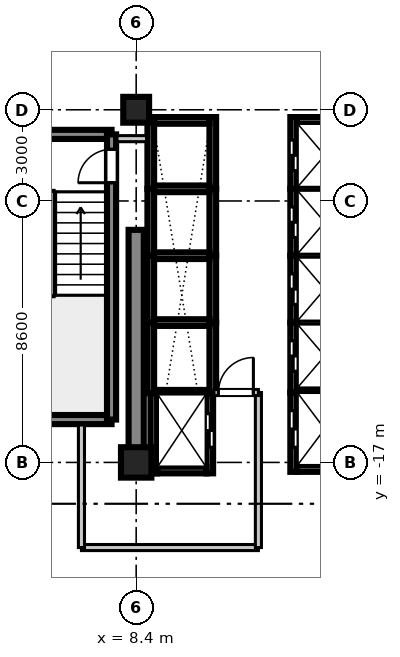
"""IFC4 building model, lengths in metres.
Left out: names, types, materials, properties, quantities, classifications, styles, units other than length and angle.
Written with IfcOpenShell. Run it as: python <this file> out.ifc"""

import sys

from ifc_helpers import new_model, si_unit, direction, frame, frame_2d, origin, origin_2d, place, context, subcontext, project, spatial, rectangle, extrude, source, transform, mapped, element, fill, save


model = new_model("IFC4")
c1 = context("Model", 3, precision=1e-05, world=origin(), true_north=direction((0.0, 1.0)))
c2 = subcontext(c1, "Body", "Model", "MODEL_VIEW")
j1 = project(units=[si_unit("LENGTHUNIT", "METRE"), si_unit("PLANEANGLEUNIT", "RADIAN")], contexts=[c1])
p1 = place(None, origin())
s1 = spatial("IfcSite", under=j1, at=p1, CompositionType="ELEMENT")
p2 = place(p1, origin())
s2 = spatial("IfcBuilding", under=s1, at=p2, CompositionType="ELEMENT")
p3 = place(p2, frame((0.0, 0.0, 249.3)))
s3 = spatial("IfcBuildingStorey", under=s2, at=p3, CompositionType="ELEMENT", Elevation=249.3)
m1 = source(origin(), c2, "Body", "SweptSolid", [
    extrude(rectangle(XDim=1.0, YDim=1.0, at=origin_2d()), origin(), (0.0, 0.0, 1.0), 3.655),
])
p4 = place(p3, frame((8.4, -17.0, 0.0), z_axis=(0.0, 0.0, 1.0), x_axis=(1.0, 0.0, 0.0)))
e1 = element("IfcColumn", 1, at=p4, inside=s3, PredefinedType="COLUMN", context=c2, shape_type="MappedRepresentation", body=[
    mapped(m1, transform((0.0, 0.0, 0.0), scale=1.0)),
])
m2 = source(origin(), c2, "Body", "SweptSolid", [
    extrude(rectangle(XDim=0.85, YDim=0.85, at=origin_2d()), origin(), (0.0, 0.0, 1.0), 3.655),
])
p5 = place(p3, frame((8.4, -5.4, 0.0), z_axis=(0.0, 0.0, 1.0), x_axis=(1.0, 0.0, 0.0)))
e2 = element("IfcColumn", 2, at=p5, inside=s3, PredefinedType="PILASTER", context=c2, shape_type="MappedRepresentation", body=[
    mapped(m2, transform((0.0, 0.0, 0.0), scale=1.0)),
])
m3 = source(origin(), c2, "Body", "SweptSolid", [
    extrude(rectangle(XDim=7.65, YDim=0.5, at=frame_2d((3.825, 0.0))), origin(), (0.0, 0.0, 1.0), 3.41),
])
p6 = place(p3, frame((8.4, -17.0, 0.0), z_axis=(0.0, 0.0, 1.0), x_axis=(0.0, 1.0, 0.0)))
e3 = element("IfcWall", 3, at=p6, inside=s3, PredefinedType="SHEAR", context=c2, shape_type="MappedRepresentation", body=[
    mapped(m3, transform((0.0, 0.0, 0.0), scale=1.0)),
])
m4 = source(origin(), c2, "Body", "SweptSolid", [
    extrude(rectangle(XDim=3.98, YDim=0.3, at=frame_2d((1.99, 0.0))), origin(), (0.0, 0.0, 1.0), 3.41),
])
for number, where, z_axis, x_axis in (
    (4, (3.61, -15.59, 0.0), (0.0, 0.0, 1.0), (1.0, 0.0, 0.0)),
    (5, (3.61, -6.21, 0.0), (0.0, 0.0, 1.0), (1.0, 0.0, 0.0)),
):
    element("IfcWall", number, at=place(p3, frame(where, z_axis=z_axis, x_axis=x_axis)), inside=s3, PredefinedType="SHEAR", context=c2, shape_type="MappedRepresentation", body=[
        mapped(m4, transform((0.0, 0.0, 0.0), scale=1.0)),
    ])
m5 = source(origin(), c2, "Body", "SweptSolid", [
    extrude(rectangle(XDim=9.38, YDim=0.3, at=frame_2d((4.69, 0.0))), origin(), (0.0, 0.0, 1.0), 3.41),
])
p7 = place(p3, frame((7.59, -15.59, 0.0), z_axis=(0.0, 0.0, 1.0), x_axis=(0.0, 1.0, 0.0)))
e6 = element("IfcWall", 6, at=p7, inside=s3, PredefinedType="SHEAR", context=c2, shape_type="MappedRepresentation", body=[
    mapped(m5, transform((0.0, 0.0, 0.0), scale=1.0)),
])
p8 = place(p7, frame((7.79, 0.0, 0.0)))
e7 = element("IfcOpeningElement", 7, at=p8, cuts=e6, PredefinedType="OPENING", context=c2, shape_type="SweptSolid", body=[
    extrude(rectangle(XDim=1.1, YDim=2.15, at=frame_2d((0.55, 1.075))), frame((0.0, 0.16, 0.0), z_axis=(0.0, -1.0, 0.0), x_axis=(1.0, 0.0, 0.0)), (0.0, 0.0, 1.0), 0.32),
])
m6 = source(origin(), c2, "Body", "SweptSolid", [
    extrude(rectangle(XDim=2.36, YDim=0.22, at=frame_2d((1.18, 0.0))), origin(), (0.0, 0.0, 1.0), 3.41),
])
p9 = place(p3, frame((13.58, -8.0, 0.0), z_axis=(0.0, 0.0, 1.0), x_axis=(0.0, 1.0, 0.0)))
e8 = element("IfcWall", 8, at=p9, inside=s3, PredefinedType="SHEAR", context=c2, shape_type="MappedRepresentation", body=[
    mapped(m6, transform((0.0, 0.0, 0.0), scale=1.0)),
])
p10 = place(p9, frame((0.6, 0.0, 0.0)))
e9 = element("IfcOpeningElement", 9, at=p10, cuts=e8, PredefinedType="OPENING", context=c2, shape_type="SweptSolid", body=[
    extrude(rectangle(XDim=1.0, YDim=2.2, at=frame_2d((0.5, 1.1))), frame((0.0, 0.12, 0.0), z_axis=(0.0, -1.0, 0.0), x_axis=(1.0, 0.0, 0.0)), (0.0, 0.0, 1.0), 0.24),
])
m7 = source(origin(), c2, "Body", "SweptSolid", [
    extrude(rectangle(XDim=1.82, YDim=0.22, at=frame_2d((0.91, 0.0))), origin(), (0.0, 0.0, 1.0), 3.41),
])
p11 = place(p3, frame((13.69, -5.75, 0.0), z_axis=(0.0, 0.0, 1.0), x_axis=(1.0, 0.0, 0.0)))
e10 = element("IfcWall", 10, at=p11, inside=s3, PredefinedType="SHEAR", context=c2, shape_type="MappedRepresentation", body=[
    mapped(m7, transform((0.0, 0.0, 0.0), scale=1.0)),
])
m8 = source(origin(), c2, "Body", "SweptSolid", [
    extrude(rectangle(XDim=2.2, YDim=0.22, at=frame_2d((1.1, 0.0))), origin(), (0.0, 0.0, 1.0), 3.41),
])
p12 = place(p3, frame((13.58, -10.2, 0.0), z_axis=(0.0, 0.0, 1.0), x_axis=(0.0, 1.0, 0.0)))
e11 = element("IfcWall", 11, at=p12, inside=s3, PredefinedType="SHEAR", context=c2, shape_type="MappedRepresentation", body=[
    mapped(m8, transform((0.0, 0.0, 0.0), scale=1.0)),
])
p13 = place(p12, frame((0.6, 0.0, 0.0)))
e12 = element("IfcOpeningElement", 12, at=p13, cuts=e11, PredefinedType="OPENING", context=c2, shape_type="SweptSolid", body=[
    extrude(rectangle(XDim=1.0, YDim=2.2, at=frame_2d((0.5, 1.1))), frame((0.0, 0.12, 0.0), z_axis=(0.0, -1.0, 0.0), x_axis=(1.0, 0.0, 0.0)), (0.0, 0.0, 1.0), 0.24),
])
m9 = source(origin(), c2, "Body", "SweptSolid", [
    extrude(rectangle(XDim=1.82, YDim=0.22, at=frame_2d((0.91, 0.0))), origin(), (0.0, 0.0, 1.0), 3.7),
])
p14 = place(p3, frame((13.69, -8.0, 0.0), z_axis=(0.0, 0.0, 1.0), x_axis=(1.0, 0.0, 0.0)))
e13 = element("IfcWall", 13, at=p14, inside=s3, PredefinedType="SHEAR", context=c2, shape_type="MappedRepresentation", body=[
    mapped(m9, transform((0.0, 0.0, 0.0), scale=1.0)),
])
p15 = place(p3, frame((13.58, -12.4, 0.0), z_axis=(0.0, 0.0, 1.0), x_axis=(0.0, 1.0, 0.0)))
e14 = element("IfcWall", 14, at=p15, inside=s3, PredefinedType="SHEAR", context=c2, shape_type="MappedRepresentation", body=[
    mapped(m8, transform((0.0, 0.0, 0.0), scale=1.0)),
])
p16 = place(p15, frame((0.6, 0.0, 0.0)))
e15 = element("IfcOpeningElement", 15, at=p16, cuts=e14, PredefinedType="OPENING", context=c2, shape_type="SweptSolid", body=[
    extrude(rectangle(XDim=1.0, YDim=2.2, at=frame_2d((0.5, 1.1))), frame((0.0, 0.12, 0.0), z_axis=(0.0, -1.0, 0.0), x_axis=(1.0, 0.0, 0.0)), (0.0, 0.0, 1.0), 0.24),
])
p17 = place(p3, frame((13.69, -10.2, 0.0), z_axis=(0.0, 0.0, 1.0), x_axis=(1.0, 0.0, 0.0)))
e16 = element("IfcWall", 16, at=p17, inside=s3, PredefinedType="SHEAR", context=c2, shape_type="MappedRepresentation", body=[
    mapped(m9, transform((0.0, 0.0, 0.0), scale=1.0)),
])
m10 = source(origin(), c2, "Body", "SweptSolid", [
    extrude(rectangle(XDim=2.3, YDim=0.22, at=frame_2d((1.15, 0.0))), origin(), (0.0, 0.0, 1.0), 3.41),
])
p18 = place(p3, frame((13.58, -14.7, 0.0), z_axis=(0.0, 0.0, 1.0), x_axis=(0.0, 1.0, 0.0)))
e17 = element("IfcWall", 17, at=p18, inside=s3, PredefinedType="SHEAR", context=c2, shape_type="MappedRepresentation", body=[
    mapped(m10, transform((0.0, 0.0, 0.0), scale=1.0)),
])
p19 = place(p18, frame((0.7, 0.0, 0.0)))
e18 = element("IfcOpeningElement", 18, at=p19, cuts=e17, PredefinedType="OPENING", context=c2, shape_type="SweptSolid", body=[
    extrude(rectangle(XDim=1.0, YDim=2.2, at=frame_2d((0.5, 1.1))), frame((0.0, 0.12, 0.0), z_axis=(0.0, -1.0, 0.0), x_axis=(1.0, 0.0, 0.0)), (0.0, 0.0, 1.0), 0.24),
])
p20 = place(p3, frame((13.69, -12.4, 0.0), z_axis=(0.0, 0.0, 1.0), x_axis=(1.0, 0.0, 0.0)))
e19 = element("IfcWall", 19, at=p20, inside=s3, PredefinedType="SHEAR", context=c2, shape_type="MappedRepresentation", body=[
    mapped(m9, transform((0.0, 0.0, 0.0), scale=1.0)),
])
for number, where, z_axis, x_axis in (
    (20, (8.88, -8.0, 0.0), (0.0, 0.0, 1.0), (0.0, 1.0, 0.0)),
    (21, (10.92, -8.0, 0.0), (0.0, 0.0, 1.0), (0.0, 1.0, 0.0)),
):
    element("IfcWall", number, at=place(p3, frame(where, z_axis=z_axis, x_axis=x_axis)), inside=s3, PredefinedType="SHEAR", context=c2, shape_type="MappedRepresentation", body=[
        mapped(m6, transform((0.0, 0.0, 0.0), scale=1.0)),
    ])
p21 = place(p3, frame((8.99, -5.75, 0.0), z_axis=(0.0, 0.0, 1.0), x_axis=(1.0, 0.0, 0.0)))
e22 = element("IfcWall", 22, at=p21, inside=s3, PredefinedType="SHEAR", context=c2, shape_type="MappedRepresentation", body=[
    mapped(m7, transform((0.0, 0.0, 0.0), scale=1.0)),
])
for number, where, z_axis, x_axis in (
    (23, (8.88, -10.2, 0.0), (0.0, 0.0, 1.0), (0.0, 1.0, 0.0)),
    (24, (10.92, -10.2, 0.0), (0.0, 0.0, 1.0), (0.0, 1.0, 0.0)),
):
    element("IfcWall", number, at=place(p3, frame(where, z_axis=z_axis, x_axis=x_axis)), inside=s3, PredefinedType="SHEAR", context=c2, shape_type="MappedRepresentation", body=[
        mapped(m8, transform((0.0, 0.0, 0.0), scale=1.0)),
    ])
p22 = place(p3, frame((8.99, -8.0, 0.0), z_axis=(0.0, 0.0, 1.0), x_axis=(1.0, 0.0, 0.0)))
e25 = element("IfcWall", 25, at=p22, inside=s3, PredefinedType="SHEAR", context=c2, shape_type="MappedRepresentation", body=[
    mapped(m9, transform((0.0, 0.0, 0.0), scale=1.0)),
])
for number, where, z_axis, x_axis in (
    (26, (8.88, -12.4, 0.0), (0.0, 0.0, 1.0), (0.0, 1.0, 0.0)),
    (27, (10.92, -12.4, 0.0), (0.0, 0.0, 1.0), (0.0, 1.0, 0.0)),
):
    element("IfcWall", number, at=place(p3, frame(where, z_axis=z_axis, x_axis=x_axis)), inside=s3, PredefinedType="SHEAR", context=c2, shape_type="MappedRepresentation", body=[
        mapped(m8, transform((0.0, 0.0, 0.0), scale=1.0)),
    ])
p23 = place(p3, frame((8.99, -10.2, 0.0), z_axis=(0.0, 0.0, 1.0), x_axis=(1.0, 0.0, 0.0)))
e28 = element("IfcWall", 28, at=p23, inside=s3, PredefinedType="SHEAR", context=c2, shape_type="MappedRepresentation", body=[
    mapped(m9, transform((0.0, 0.0, 0.0), scale=1.0)),
])
m11 = source(origin(), c2, "Body", "SweptSolid", [
    extrude(rectangle(XDim=2.325, YDim=0.22, at=frame_2d((1.163, 0.0))), origin(), (0.0, 0.0, 1.0), 3.41),
])
for number, where, z_axis, x_axis in (
    (29, (8.88, -14.725, 0.0), (0.0, 0.0, 1.0), (0.0, 1.0, 0.0)),
    (30, (10.92, -14.725, 0.0), (0.0, 0.0, 1.0), (0.0, 1.0, 0.0)),
):
    element("IfcWall", number, at=place(p3, frame(where, z_axis=z_axis, x_axis=x_axis)), inside=s3, PredefinedType="SHEAR", context=c2, shape_type="MappedRepresentation", body=[
        mapped(m11, transform((0.0, 0.0, 0.0), scale=1.0)),
    ])
p24 = place(p3, frame((8.99, -12.4, 0.0), z_axis=(0.0, 0.0, 1.0), x_axis=(1.0, 0.0, 0.0)))
e31 = element("IfcWall", 31, at=p24, inside=s3, PredefinedType="SHEAR", context=c2, shape_type="MappedRepresentation", body=[
    mapped(m9, transform((0.0, 0.0, 0.0), scale=1.0)),
])
m12 = source(origin(), c2, "Body", "SweptSolid", [
    extrude(rectangle(XDim=2.635, YDim=0.22, at=frame_2d((1.317, 0.0))), origin(), (0.0, 0.0, 1.0), 3.41),
])
p25 = place(p3, frame((8.98, -17.36, 0.0), z_axis=(0.0, 0.0, 1.0), x_axis=(0.0, 1.0, 0.0)))
e32 = element("IfcWall", 32, at=p25, inside=s3, PredefinedType="SHEAR", context=c2, shape_type="MappedRepresentation", body=[
    mapped(m12, transform((0.0, 0.0, 0.0), scale=1.0)),
])
p26 = place(p3, frame((10.82, -17.36, 0.0), z_axis=(0.0, 0.0, 1.0), x_axis=(0.0, 1.0, 0.0)))
e33 = element("IfcWall", 33, at=p26, inside=s3, PredefinedType="SHEAR", context=c2, shape_type="MappedRepresentation", body=[
    mapped(m12, transform((0.0, 0.0, 0.0), scale=1.0)),
])
p27 = place(p26, frame((0.86, 0.0, 0.0)))
e34 = element("IfcOpeningElement", 34, at=p27, cuts=e33, PredefinedType="OPENING", context=c2, shape_type="SweptSolid", body=[
    extrude(rectangle(XDim=1.1, YDim=2.2, at=frame_2d((0.55, 1.1))), frame((0.0, 0.12, 0.0), z_axis=(0.0, -1.0, 0.0), x_axis=(1.0, 0.0, 0.0)), (0.0, 0.0, 1.0), 0.24),
])
m13 = source(origin(), c2, "Body", "SweptSolid", [
    extrude(rectangle(XDim=1.62, YDim=0.22, at=frame_2d((0.81, 0.0))), origin(), (0.0, 0.0, 1.0), 3.41),
])
p28 = place(p3, frame((9.09, -17.25, 0.0), z_axis=(0.0, 0.0, 1.0), x_axis=(1.0, 0.0, 0.0)))
e35 = element("IfcWall", 35, at=p28, inside=s3, PredefinedType="SHEAR", context=c2, shape_type="MappedRepresentation", body=[
    mapped(m13, transform((0.0, 0.0, 0.0), scale=1.0)),
])
m14 = source(origin(), c2, "Body", "SweptSolid", [
    extrude(rectangle(XDim=1.62, YDim=0.22, at=frame_2d((0.81, 0.0))), origin(), (0.0, 0.0, 1.0), 3.7),
])
p29 = place(p3, frame((9.09, -14.725, 0.0), z_axis=(0.0, 0.0, 1.0), x_axis=(1.0, 0.0, 0.0)))
e36 = element("IfcWall", 36, at=p29, inside=s3, PredefinedType="SHEAR", context=c2, shape_type="MappedRepresentation", body=[
    mapped(m14, transform((0.0, 0.0, 0.0), scale=1.0)),
])
m15 = source(origin(), c2, "Body", "SweptSolid", [
    extrude(rectangle(XDim=2.61, YDim=0.22, at=frame_2d((1.305, 0.0))), origin(), (0.0, 0.0, 1.0), 3.41),
])
p30 = place(p3, frame((13.58, -17.31, 0.0), z_axis=(0.0, 0.0, 1.0), x_axis=(0.0, 1.0, 0.0)))
e37 = element("IfcWall", 37, at=p30, inside=s3, PredefinedType="SHEAR", context=c2, shape_type="MappedRepresentation", body=[
    mapped(m15, transform((0.0, 0.0, 0.0), scale=1.0)),
])
p31 = place(p30, frame((0.81, 0.0, 0.0)))
e38 = element("IfcOpeningElement", 38, at=p31, cuts=e37, PredefinedType="OPENING", context=c2, shape_type="SweptSolid", body=[
    extrude(rectangle(XDim=1.2, YDim=2.2, at=frame_2d((0.6, 1.1))), frame((0.0, 0.12, 0.0), z_axis=(0.0, -1.0, 0.0), x_axis=(1.0, 0.0, 0.0)), (0.0, 0.0, 1.0), 0.24),
])
p32 = place(p3, frame((13.69, -17.2, 0.0), z_axis=(0.0, 0.0, 1.0), x_axis=(1.0, 0.0, 0.0)))
e39 = element("IfcWall", 39, at=p32, inside=s3, PredefinedType="SHEAR", context=c2, shape_type="MappedRepresentation", body=[
    mapped(m7, transform((0.0, 0.0, 0.0), scale=1.0)),
])
p33 = place(p3, frame((13.69, -14.7, 0.0), z_axis=(0.0, 0.0, 1.0), x_axis=(1.0, 0.0, 0.0)))
e40 = element("IfcWall", 40, at=p33, inside=s3, PredefinedType="SHEAR", context=c2, shape_type="MappedRepresentation", body=[
    mapped(m9, transform((0.0, 0.0, 0.0), scale=1.0)),
])
m16 = source(origin(), c2, "Body", "SweptSolid", [
    extrude(rectangle(XDim=5.82, YDim=0.2, at=frame_2d((2.91, 0.0))), origin(), (0.0, 0.0, 1.0), 2.75),
])
p34 = place(p3, frame((6.6, -19.8, 0.0), z_axis=(0.0, 0.0, 1.0), x_axis=(1.0, 0.0, 0.0)))
e41 = element("IfcWall", 41, at=p34, inside=s3, PredefinedType="PARTITIONING", context=c2, shape_type="MappedRepresentation", body=[
    mapped(m16, transform((0.0, 0.0, 0.0), scale=1.0)),
])
m17 = source(origin(), c2, "Body", "SweptSolid", [
    extrude(rectangle(XDim=4.03, YDim=0.2, at=frame_2d((2.015, 0.0))), origin(), (0.0, 0.0, 1.0), 2.75),
])
p35 = place(p3, frame((6.6, -19.8, 0.0), z_axis=(0.0, 0.0, 1.0), x_axis=(0.0, 1.0, 0.0)))
e42 = element("IfcWall", 42, at=p35, inside=s3, PredefinedType="PARTITIONING", context=c2, shape_type="MappedRepresentation", body=[
    mapped(m17, transform((0.0, 0.0, 0.0), scale=1.0)),
])
m18 = source(origin(), c2, "Body", "SweptSolid", [
    extrude(rectangle(XDim=5.1, YDim=0.2, at=frame_2d((2.55, 0.0))), origin(), (0.0, 0.0, 1.0), 2.75),
])
p36 = place(p3, frame((12.42, -19.8, 0.0), z_axis=(0.0, 0.0, 1.0), x_axis=(0.0, 1.0, 0.0)))
e43 = element("IfcWall", 43, at=p36, inside=s3, PredefinedType="PARTITIONING", context=c2, shape_type="MappedRepresentation", body=[
    mapped(m18, transform((0.0, 0.0, 0.0), scale=1.0)),
])
m19 = source(origin(), c2, "Body", "SweptSolid", [
    extrude(rectangle(XDim=1.46, YDim=0.2, at=frame_2d((0.73, 0.0))), origin(), (0.0, 0.0, 1.0), 2.75),
])
p37 = place(p3, frame((10.96, -14.7, 0.0), z_axis=(0.0, 0.0, 1.0), x_axis=(1.0, 0.0, 0.0)))
e44 = element("IfcWall", 44, at=p37, inside=s3, PredefinedType="PARTITIONING", context=c2, shape_type="MappedRepresentation", body=[
    mapped(m19, transform((0.0, 0.0, 0.0), scale=1.0)),
])
p38 = place(p37, frame((0.145, 0.0, 0.0)))
e45 = element("IfcOpeningElement", 45, at=p38, cuts=e44, PredefinedType="OPENING", context=c2, shape_type="SweptSolid", body=[
    extrude(rectangle(XDim=1.15, YDim=2.15, at=frame_2d((0.575, 1.075))), frame((0.0, 0.11, 0.0), z_axis=(0.0, -1.0, 0.0), x_axis=(1.0, 0.0, 0.0)), (0.0, 0.0, 1.0), 0.22),
])
m20 = source(origin(), c2, "Body", "SweptSolid", [
    extrude(rectangle(XDim=0.97, YDim=0.2, at=frame_2d((0.485, 0.0))), origin(), (0.0, 0.0, 1.0), 2.75),
])
p39 = place(p3, frame((7.77, -6.35, 0.0), z_axis=(0.0, 0.0, 1.0), x_axis=(1.0, 0.0, 0.0)))
e46 = element("IfcWall", 46, at=p39, inside=s3, PredefinedType="PARTITIONING", context=c2, shape_type="MappedRepresentation", body=[
    mapped(m20, transform((0.0, 0.0, 0.0), scale=1.0)),
])
m21 = source(origin(), c2, "Body", "SweptSolid", [
    extrude(rectangle(XDim=1.1, YDim=2.15, at=frame_2d((0.55, 1.075))), frame((0.0, 0.025, 0.0), z_axis=(0.0, -1.0, 0.0), x_axis=(1.0, 0.0, 0.0)), (0.0, 0.0, 1.0), 0.05),
])
p40 = place(p8, origin())
e47 = element("IfcDoor", 47, at=p40, inside=s3, OperationType="SINGLE_SWING_LEFT", PredefinedType="DOOR", context=c2, shape_type="MappedRepresentation", body=[
    mapped(m21, transform((0.0, 0.0, 0.0), scale=1.0)),
])
fill(e7, e47)
m22 = source(origin(), c2, "Body", "SweptSolid", [
    extrude(rectangle(XDim=1.0, YDim=2.2, at=frame_2d((0.5, 1.1))), frame((0.0, 0.025, 0.0), z_axis=(0.0, -1.0, 0.0), x_axis=(1.0, 0.0, 0.0)), (0.0, 0.0, 1.0), 0.05),
])
p41 = place(p10, origin())
e48 = element("IfcDoor", 48, at=p41, inside=s3, OperationType="DOUBLE_DOOR_SLIDING", PredefinedType="DOOR", context=c2, shape_type="MappedRepresentation", body=[
    mapped(m22, transform((0.0, 0.0, 0.0), scale=1.0)),
])
fill(e9, e48)
p42 = place(p13, origin())
e49 = element("IfcDoor", 49, at=p42, inside=s3, OperationType="DOUBLE_DOOR_SLIDING", PredefinedType="DOOR", context=c2, shape_type="MappedRepresentation", body=[
    mapped(m22, transform((0.0, 0.0, 0.0), scale=1.0)),
])
fill(e12, e49)
p43 = place(p16, origin())
e50 = element("IfcDoor", 50, at=p43, inside=s3, OperationType="DOUBLE_DOOR_SLIDING", PredefinedType="DOOR", context=c2, shape_type="MappedRepresentation", body=[
    mapped(m22, transform((0.0, 0.0, 0.0), scale=1.0)),
])
fill(e15, e50)
p44 = place(p19, origin())
e51 = element("IfcDoor", 51, at=p44, inside=s3, OperationType="DOUBLE_DOOR_SLIDING", PredefinedType="DOOR", context=c2, shape_type="MappedRepresentation", body=[
    mapped(m22, transform((0.0, 0.0, 0.0), scale=1.0)),
])
fill(e18, e51)
m23 = source(origin(), c2, "Body", "SweptSolid", [
    extrude(rectangle(XDim=1.1, YDim=2.2, at=frame_2d((0.55, 1.1))), frame((0.0, 0.025, 0.0), z_axis=(0.0, -1.0, 0.0), x_axis=(1.0, 0.0, 0.0)), (0.0, 0.0, 1.0), 0.05),
])
p45 = place(p27, frame((1.1, 0.0, 0.0), z_axis=(0.0, 0.0, 1.0), x_axis=(-1.0, 0.0, 0.0)))
e52 = element("IfcDoor", 52, at=p45, inside=s3, OperationType="DOUBLE_DOOR_SLIDING", PredefinedType="DOOR", context=c2, shape_type="MappedRepresentation", body=[
    mapped(m23, transform((0.0, 0.0, 0.0), scale=1.0)),
])
fill(e34, e52)
m24 = source(origin(), c2, "Body", "SweptSolid", [
    extrude(rectangle(XDim=1.2, YDim=2.2, at=frame_2d((0.6, 1.1))), frame((0.0, 0.025, 0.0), z_axis=(0.0, -1.0, 0.0), x_axis=(1.0, 0.0, 0.0)), (0.0, 0.0, 1.0), 0.05),
])
p46 = place(p31, origin())
e53 = element("IfcDoor", 53, at=p46, inside=s3, OperationType="DOUBLE_DOOR_SLIDING", PredefinedType="DOOR", context=c2, shape_type="MappedRepresentation", body=[
    mapped(m24, transform((0.0, 0.0, 0.0), scale=1.0)),
])
fill(e38, e53)
m25 = source(origin(), c2, "Body", "SweptSolid", [
    extrude(rectangle(XDim=1.15, YDim=2.15, at=frame_2d((0.575, 1.075))), frame((0.0, 0.025, 0.0), z_axis=(0.0, -1.0, 0.0), x_axis=(1.0, 0.0, 0.0)), (0.0, 0.0, 1.0), 0.05),
])
p47 = place(p38, origin())
e54 = element("IfcDoor", 54, at=p47, inside=s3, OperationType="SINGLE_SWING_RIGHT", PredefinedType="DOOR", context=c2, shape_type="MappedRepresentation", body=[
    mapped(m25, transform((0.0, 0.0, 0.0), scale=1.0)),
])
fill(e45, e54)
save(model, sys.argv[1])
